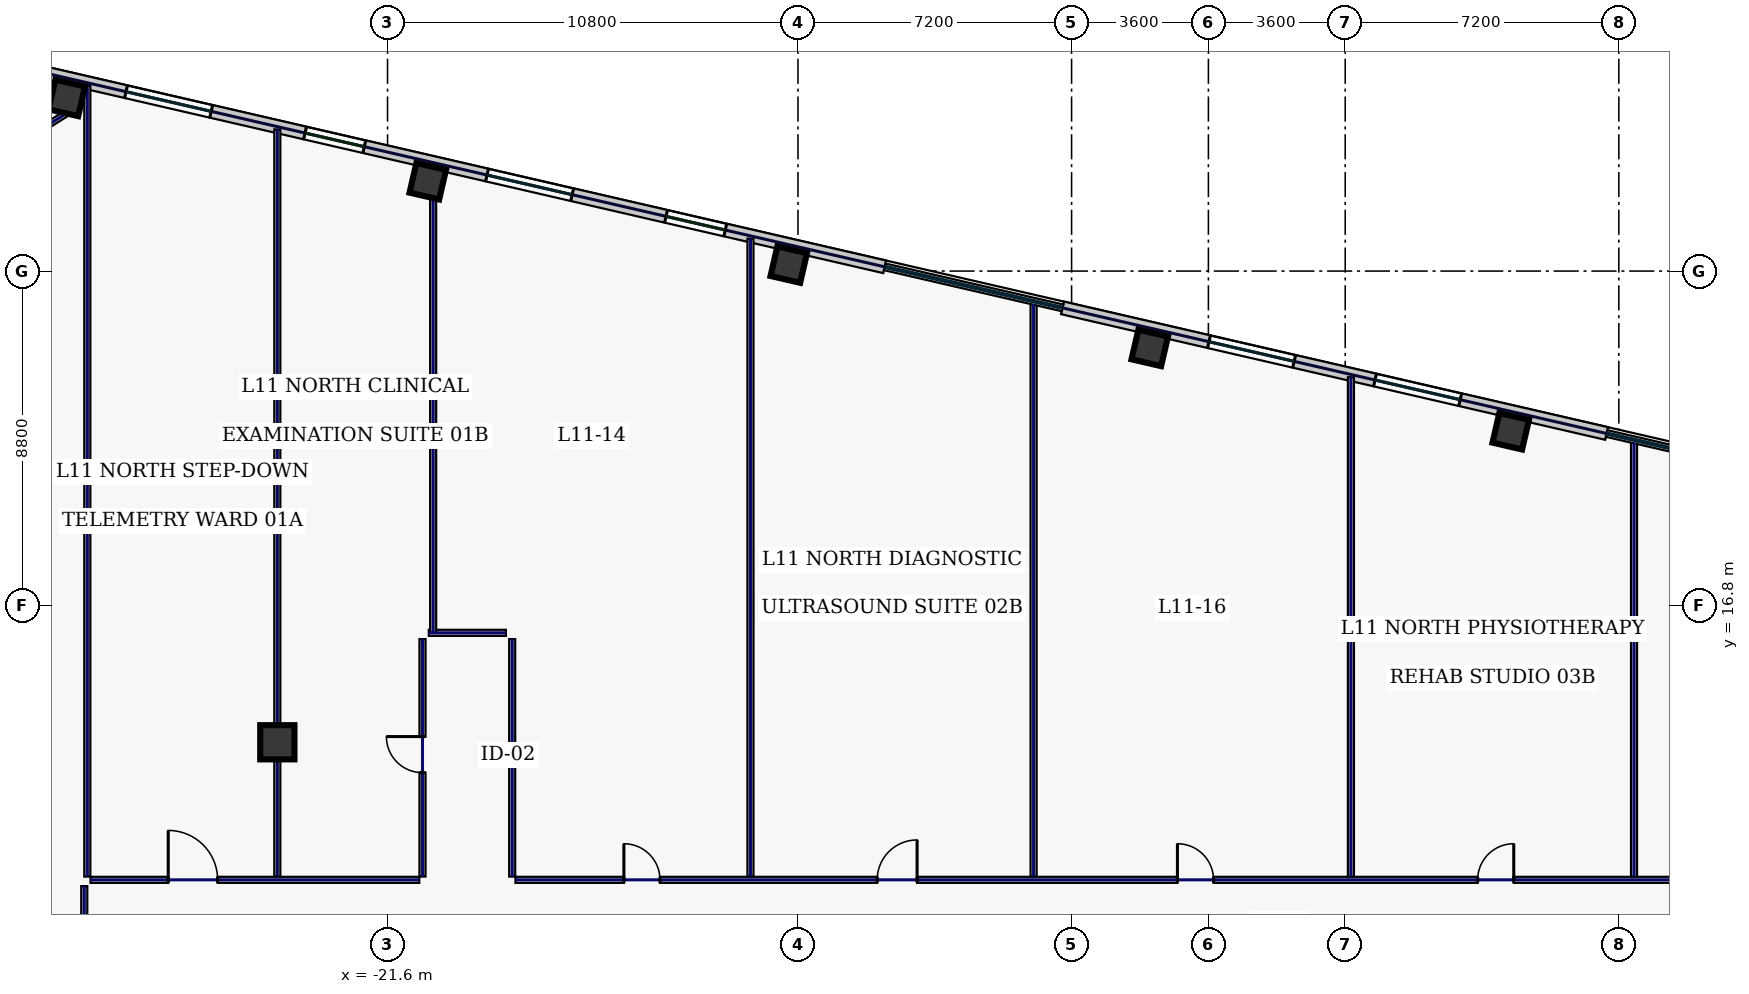
"""IFC4 building model, lengths in metres.
Left out: names, types, materials, properties, quantities, classifications, styles, units other than length and angle.
Written with IfcOpenShell. Run it as: python <this file> out.ifc"""

import sys

from ifc_helpers import new_model, si_unit, direction, frame, frame_2d, origin, origin_2d, place, context, subcontext, project, spatial, rectangle, hollow_rectangle, extrude, element, fill, save


model = new_model("IFC4")
c1 = context("Model", 3, precision=1e-05, world=origin(), true_north=direction((0.0, 1.0)))
c2 = subcontext(c1, "Body", "Model", "MODEL_VIEW")
j1 = project(units=[si_unit("LENGTHUNIT", "METRE"), si_unit("PLANEANGLEUNIT", "RADIAN")], contexts=[c1])
p1 = place(None, origin())
s1 = spatial("IfcSite", under=j1, at=p1, CompositionType="ELEMENT")
p2 = place(p1, origin())
s2 = spatial("IfcBuilding", under=s1, at=p2, CompositionType="ELEMENT")
p3 = place(p2, frame((0.0, 0.0, 55.4)))
s3 = spatial("IfcBuildingStorey", under=s2, at=p3, CompositionType="ELEMENT", Elevation=55.4)
p4 = place(p3, frame((-24.5, 13.2, 0.0), z_axis=(0.0, 0.0, 1.0), x_axis=(1.0, 0.0, 0.0)))
e1 = element("IfcColumn", 1, at=p4, inside=s3, PredefinedType="COLUMN", context=c2, shape_type="SweptSolid", body=[
    extrude(hollow_rectangle(XDim=0.9, YDim=0.9, WallThickness=0.04, at=origin_2d()), origin(), (0.0, 0.0, 1.0), 3.74),
])
for number, where, z_axis, x_axis in (
    (2, (7.955, 21.385, 0.0), (0.0, 0.0, 1.0), (0.974, -0.225, 0.0)),
    (3, (-1.544, 23.578, 0.0), (0.0, 0.0, 1.0), (0.974, -0.225, 0.0)),
    (4, (-11.042, 25.771, 0.0), (0.0, 0.0, 1.0), (0.974, -0.225, 0.0)),
    (5, (-20.541, 27.964, 0.0), (0.0, 0.0, 1.0), (0.974, -0.225, 0.0)),
    (6, (-30.04, 30.156, 0.0), (0.0, 0.0, 1.0), (0.974, -0.225, 0.0)),
):
    element("IfcColumn", number, at=place(p3, frame(where, z_axis=z_axis, x_axis=x_axis)), inside=s3, PredefinedType="COLUMN", context=c2, shape_type="SweptSolid", body=[
        extrude(hollow_rectangle(XDim=0.8, YDim=0.8, WallThickness=0.036, at=origin_2d()), origin(), (0.0, 0.0, 1.0), 3.74),
    ])
p5 = place(p3, frame((10.481, 21.325, 0.0), z_axis=(0.0, 0.0, 1.0), x_axis=(-0.974369353393, 0.2249541357, 0.0)))
e7 = element("IfcWall", 7, at=p5, inside=s3, PredefinedType="STANDARD", context=c2, shape_type="SweptSolid", body=[
    extrude(rectangle(XDim=14.697, YDim=0.34, at=frame_2d((7.349, 0.0))), origin(), (0.0, 0.0, 1.0), 3.74),
])
p6 = place(p5, frame((8.441, 0.0, 0.77)))
e8 = element("IfcOpeningElement", 8, at=p6, cuts=e7, PredefinedType="OPENING", context=c2, shape_type="SweptSolid", body=[
    extrude(rectangle(XDim=2.3, YDim=2.1, at=frame_2d((1.15, 1.05))), frame((0.0, 0.18, 0.0), z_axis=(0.0, -1.0, 0.0), x_axis=(1.0, 0.0, 0.0)), (0.0, 0.0, 1.0), 0.36),
])
p7 = place(p5, frame((3.956, 0.0, 0.77)))
e9 = element("IfcOpeningElement", 9, at=p7, cuts=e7, PredefinedType="OPENING", context=c2, shape_type="SweptSolid", body=[
    extrude(rectangle(XDim=2.3, YDim=2.1, at=frame_2d((1.15, 1.05))), frame((0.0, 0.18, 0.0), z_axis=(0.0, -1.0, 0.0), x_axis=(1.0, 0.0, 0.0)), (0.0, 0.0, 1.0), 0.36),
])
p8 = place(p3, frame((-8.517, 25.711, 0.0), z_axis=(0.0, 0.0, 1.0), x_axis=(-0.974372845456, 0.224939009598, 0.0)))
e10 = element("IfcWall", 10, at=p8, inside=s3, PredefinedType="STANDARD", context=c2, shape_type="SweptSolid", body=[
    extrude(rectangle(XDim=22.652, YDim=0.34, at=frame_2d((11.326, 0.0))), origin(), (0.0, 0.0, 1.0), 3.74),
])
p9 = place(p8, frame((18.189, 0.0, 0.77)))
e11 = element("IfcOpeningElement", 11, at=p9, cuts=e10, PredefinedType="OPENING", context=c2, shape_type="SweptSolid", body=[
    extrude(rectangle(XDim=2.3, YDim=2.1, at=frame_2d((1.15, 1.05))), frame((0.0, 0.18, 0.0), z_axis=(0.0, -1.0, 0.0), x_axis=(1.0, 0.0, 0.0)), (0.0, 0.0, 1.0), 0.36),
])
p10 = place(p8, frame((14.055, 0.0, 0.22)))
e12 = element("IfcOpeningElement", 12, at=p10, cuts=e10, PredefinedType="OPENING", context=c2, shape_type="SweptSolid", body=[
    extrude(rectangle(XDim=1.6, YDim=1.2, at=frame_2d((0.8, 0.6))), frame((0.0, 0.18, 0.0), z_axis=(0.0, -1.0, 0.0), x_axis=(1.0, 0.0, 0.0)), (0.0, 0.0, 1.0), 0.36),
])
p11 = place(p8, frame((8.441, 0.0, 0.77)))
e13 = element("IfcOpeningElement", 13, at=p11, cuts=e10, PredefinedType="OPENING", context=c2, shape_type="SweptSolid", body=[
    extrude(rectangle(XDim=2.3, YDim=2.1, at=frame_2d((1.15, 1.05))), frame((0.0, 0.18, 0.0), z_axis=(0.0, -1.0, 0.0), x_axis=(1.0, 0.0, 0.0)), (0.0, 0.0, 1.0), 0.36),
])
p12 = place(p8, frame((4.306, 0.0, 0.22)))
e14 = element("IfcOpeningElement", 14, at=p12, cuts=e10, PredefinedType="OPENING", context=c2, shape_type="SweptSolid", body=[
    extrude(rectangle(XDim=1.6, YDim=1.2, at=frame_2d((0.8, 0.6))), frame((0.0, 0.18, 0.0), z_axis=(0.0, -1.0, 0.0), x_axis=(1.0, 0.0, 0.0)), (0.0, 0.0, 1.0), 0.36),
])
p13 = place(p3, frame((-29.86, 29.868, 0.0), z_axis=(0.0, 0.0, 1.0), x_axis=(-0.848043064089, -0.529927317139, 0.0)))
e15 = element("IfcWall", 15, at=p13, inside=s3, PredefinedType="PARTITIONING", context=c2, shape_type="SweptSolid", body=[
    extrude(rectangle(XDim=7.354, YDim=0.16, at=frame_2d((3.677, 0.0))), origin(), (0.0, 0.0, 1.0), 3.74),
])
p14 = place(p3, frame((-29.58, -9.215, 0.0), z_axis=(0.0, 0.0, 1.0), x_axis=(0.0, 1.0, 0.0)))
e16 = element("IfcWall", 16, at=p14, inside=s3, PredefinedType="PARTITIONING", context=c2, shape_type="SweptSolid", body=[
    extrude(rectangle(XDim=18.63, YDim=0.16, at=frame_2d((9.315, 0.0))), origin(), (0.0, 0.0, 1.0), 3.74),
])
p15 = place(p14, frame((1.769, 0.0, 0.0)))
e17 = element("IfcOpeningElement", 17, at=p15, cuts=e16, PredefinedType="OPENING", context=c2, shape_type="SweptSolid", body=[
    extrude(rectangle(XDim=0.95, YDim=2.2, at=frame_2d((0.475, 1.1))), frame((0.0, 0.09, 0.0), z_axis=(0.0, -1.0, 0.0), x_axis=(1.0, 0.0, 0.0)), (0.0, 0.0, 1.0), 0.18),
])
p16 = place(p14, frame((5.6, 0.0, 0.0)))
e18 = element("IfcOpeningElement", 18, at=p16, cuts=e16, PredefinedType="OPENING", context=c2, shape_type="SweptSolid", body=[
    extrude(rectangle(XDim=0.95, YDim=2.2, at=frame_2d((0.475, 1.1))), frame((0.0, 0.09, 0.0), z_axis=(0.0, -1.0, 0.0), x_axis=(1.0, 0.0, 0.0)), (0.0, 0.0, 1.0), 0.18),
])
p17 = place(p14, frame((10.8, 0.0, 0.0)))
e19 = element("IfcOpeningElement", 19, at=p17, cuts=e16, PredefinedType="OPENING", context=c2, shape_type="SweptSolid", body=[
    extrude(rectangle(XDim=0.95, YDim=2.2, at=frame_2d((0.475, 1.1))), frame((0.0, 0.09, 0.0), z_axis=(0.0, -1.0, 0.0), x_axis=(1.0, 0.0, 0.0)), (0.0, 0.0, 1.0), 0.18),
])
p18 = place(p14, frame((15.981, 0.0, 0.0)))
e20 = element("IfcOpeningElement", 20, at=p18, cuts=e16, PredefinedType="OPENING", context=c2, shape_type="SweptSolid", body=[
    extrude(rectangle(XDim=0.95, YDim=2.2, at=frame_2d((0.475, 1.1))), frame((0.0, 0.09, 0.0), z_axis=(0.0, -1.0, 0.0), x_axis=(1.0, 0.0, 0.0)), (0.0, 0.0, 1.0), 0.18),
])
p19 = place(p3, frame((-29.415, 9.58, 0.0), z_axis=(0.0, 0.0, 1.0), x_axis=(1.0, 0.0, 0.0)))
e21 = element("IfcWall", 21, at=p19, inside=s3, PredefinedType="PARTITIONING", context=c2, shape_type="SweptSolid", body=[
    extrude(rectangle(XDim=8.65, YDim=0.16, at=frame_2d((4.325, 0.0))), origin(), (0.0, 0.0, 1.0), 3.74),
])
p20 = place(p19, frame((2.044, 0.0, 0.0)))
e22 = element("IfcOpeningElement", 22, at=p20, cuts=e21, PredefinedType="OPENING", context=c2, shape_type="SweptSolid", body=[
    extrude(rectangle(XDim=1.3, YDim=2.2, at=frame_2d((0.65, 1.1))), frame((0.0, 0.09, 0.0), z_axis=(0.0, -1.0, 0.0), x_axis=(1.0, 0.0, 0.0)), (0.0, 0.0, 1.0), 0.18),
])
p21 = place(p3, frame((-20.68, 9.665, 0.0), z_axis=(0.0, 0.0, 1.0), x_axis=(0.0, 1.0, 0.0)))
e23 = element("IfcWall", 23, at=p21, inside=s3, PredefinedType="PARTITIONING", context=c2, shape_type="SweptSolid", body=[
    extrude(rectangle(XDim=6.25, YDim=0.16, at=frame_2d((3.125, 0.0))), origin(), (0.0, 0.0, 1.0), 3.74),
])
p22 = place(p21, frame((2.735, 0.0, 0.0)))
e24 = element("IfcOpeningElement", 24, at=p22, cuts=e23, PredefinedType="OPENING", context=c2, shape_type="SweptSolid", body=[
    extrude(rectangle(XDim=0.95, YDim=2.2, at=frame_2d((0.475, 1.1))), frame((0.0, 0.09, 0.0), z_axis=(0.0, -1.0, 0.0), x_axis=(1.0, 0.0, 0.0)), (0.0, 0.0, 1.0), 0.18),
])
p23 = place(p3, frame((-20.515, 16.08, 0.0), z_axis=(0.0, 0.0, 1.0), x_axis=(1.0, 0.0, 0.0)))
e25 = element("IfcWall", 25, at=p23, inside=s3, PredefinedType="PARTITIONING", context=c2, shape_type="SweptSolid", body=[
    extrude(rectangle(XDim=2.03, YDim=0.16, at=frame_2d((1.015, 0.0))), origin(), (0.0, 0.0, 1.0), 3.74),
])
p24 = place(p3, frame((-18.32, 15.915, 0.0), z_axis=(0.0, 0.0, 1.0), x_axis=(0.0, -1.0, 0.0)))
e26 = element("IfcWall", 26, at=p24, inside=s3, PredefinedType="PARTITIONING", context=c2, shape_type="SweptSolid", body=[
    extrude(rectangle(XDim=6.25, YDim=0.16, at=frame_2d((3.125, 0.0))), origin(), (0.0, 0.0, 1.0), 3.74),
])
p25 = place(p3, frame((-18.235, 9.58, 0.0), z_axis=(0.0, 0.0, 1.0), x_axis=(1.0, 0.0, 0.0)))
e27 = element("IfcWall", 27, at=p25, inside=s3, PredefinedType="PARTITIONING", context=c2, shape_type="SweptSolid", body=[
    extrude(rectangle(XDim=47.65, YDim=0.16, at=frame_2d((23.825, 0.0))), origin(), (0.0, 0.0, 1.0), 3.74),
])
p26 = place(p25, frame((2.854, 0.0, 0.0)))
e28 = element("IfcOpeningElement", 28, at=p26, cuts=e27, PredefinedType="OPENING", context=c2, shape_type="SweptSolid", body=[
    extrude(rectangle(XDim=0.95, YDim=2.2, at=frame_2d((0.475, 1.1))), frame((0.0, 0.09, 0.0), z_axis=(0.0, -1.0, 0.0), x_axis=(1.0, 0.0, 0.0)), (0.0, 0.0, 1.0), 0.18),
])
p27 = place(p25, frame((9.52, 0.0, 0.0)))
e29 = element("IfcOpeningElement", 29, at=p27, cuts=e27, PredefinedType="OPENING", context=c2, shape_type="SweptSolid", body=[
    extrude(rectangle(XDim=1.05, YDim=2.2, at=frame_2d((0.525, 1.1))), frame((0.0, 0.09, 0.0), z_axis=(0.0, -1.0, 0.0), x_axis=(1.0, 0.0, 0.0)), (0.0, 0.0, 1.0), 0.18),
])
p28 = place(p25, frame((17.42, 0.0, 0.0)))
e30 = element("IfcOpeningElement", 30, at=p28, cuts=e27, PredefinedType="OPENING", context=c2, shape_type="SweptSolid", body=[
    extrude(rectangle(XDim=0.95, YDim=2.2, at=frame_2d((0.475, 1.1))), frame((0.0, 0.09, 0.0), z_axis=(0.0, -1.0, 0.0), x_axis=(1.0, 0.0, 0.0)), (0.0, 0.0, 1.0), 0.18),
])
p29 = place(p25, frame((25.32, 0.0, 0.0)))
e31 = element("IfcOpeningElement", 31, at=p29, cuts=e27, PredefinedType="OPENING", context=c2, shape_type="SweptSolid", body=[
    extrude(rectangle(XDim=0.95, YDim=2.2, at=frame_2d((0.475, 1.1))), frame((0.0, 0.09, 0.0), z_axis=(0.0, -1.0, 0.0), x_axis=(1.0, 0.0, 0.0)), (0.0, 0.0, 1.0), 0.18),
])
p30 = place(p25, frame((34.67, 0.0, 0.0)))
e32 = element("IfcOpeningElement", 32, at=p30, cuts=e27, PredefinedType="OPENING", context=c2, shape_type="SweptSolid", body=[
    extrude(rectangle(XDim=1.3, YDim=2.2, at=frame_2d((0.65, 1.1))), frame((0.0, 0.09, 0.0), z_axis=(0.0, -1.0, 0.0), x_axis=(1.0, 0.0, 0.0)), (0.0, 0.0, 1.0), 0.18),
])
p31 = place(p25, frame((43.626, 0.0, 0.0)))
e33 = element("IfcOpeningElement", 33, at=p31, cuts=e27, PredefinedType="OPENING", context=c2, shape_type="SweptSolid", body=[
    extrude(rectangle(XDim=1.3, YDim=2.2, at=frame_2d((0.65, 1.1))), frame((0.0, 0.09, 0.0), z_axis=(0.0, -1.0, 0.0), x_axis=(1.0, 0.0, 0.0)), (0.0, 0.0, 1.0), 0.18),
])
p32 = place(p3, frame((-29.5, 9.665, 0.0), z_axis=(0.0, 0.0, 1.0), x_axis=(0.0, 1.0, 0.0)))
e34 = element("IfcWall", 34, at=p32, inside=s3, PredefinedType="PARTITIONING", context=c2, shape_type="SweptSolid", body=[
    extrude(rectangle(XDim=20.819, YDim=0.16, at=frame_2d((10.409, 0.0))), origin(), (0.0, 0.0, 1.0), 3.74),
])
p33 = place(p3, frame((-20.4, 16.085, 0.0), z_axis=(0.0, 0.0, 1.0), x_axis=(0.0, 1.0, 0.0)))
e35 = element("IfcWall", 35, at=p33, inside=s3, PredefinedType="PARTITIONING", context=c2, shape_type="SweptSolid", body=[
    extrude(rectangle(XDim=12.298, YDim=0.16, at=frame_2d((6.149, 0.0))), origin(), (0.0, 0.0, 1.0), 3.74),
])
p34 = place(p3, frame((-4.6, 9.665, 0.0), z_axis=(0.0, 0.0, 1.0), x_axis=(0.0, 1.0, 0.0)))
e36 = element("IfcWall", 36, at=p34, inside=s3, PredefinedType="PARTITIONING", context=c2, shape_type="SweptSolid", body=[
    extrude(rectangle(XDim=15.07, YDim=0.16, at=frame_2d((7.535, 0.0))), origin(), (0.0, 0.0, 1.0), 3.74),
])
p35 = place(p3, frame((11.2, 9.665, 0.0), z_axis=(0.0, 0.0, 1.0), x_axis=(0.0, 1.0, 0.0)))
e37 = element("IfcWall", 37, at=p35, inside=s3, PredefinedType="PARTITIONING", context=c2, shape_type="SweptSolid", body=[
    extrude(rectangle(XDim=11.422, YDim=0.16, at=frame_2d((5.711, 0.0))), origin(), (0.0, 0.0, 1.0), 3.74),
])
p36 = place(p3, frame((-24.5, 9.665, 0.0), z_axis=(0.0, 0.0, 1.0), x_axis=(0.0, 1.0, 0.0)))
e38 = element("IfcWall", 38, at=p36, inside=s3, PredefinedType="PARTITIONING", context=c2, shape_type="SweptSolid", body=[
    extrude(rectangle(XDim=19.664, YDim=0.16, at=frame_2d((9.832, 0.0))), origin(), (0.0, 0.0, 1.0), 3.235),
])
p37 = place(p3, frame((-12.05, 9.665, 0.0), z_axis=(0.0, 0.0, 1.0), x_axis=(0.0, 1.0, 0.0)))
e39 = element("IfcWall", 39, at=p37, inside=s3, PredefinedType="PARTITIONING", context=c2, shape_type="SweptSolid", body=[
    extrude(rectangle(XDim=16.79, YDim=0.16, at=frame_2d((8.395, 0.0))), origin(), (0.0, 0.0, 1.0), 3.74),
])
p38 = place(p3, frame((3.75, 9.665, 0.0), z_axis=(0.0, 0.0, 1.0), x_axis=(0.0, 1.0, 0.0)))
e40 = element("IfcWall", 40, at=p38, inside=s3, PredefinedType="PARTITIONING", context=c2, shape_type="SweptSolid", body=[
    extrude(rectangle(XDim=13.142, YDim=0.16, at=frame_2d((6.571, 0.0))), origin(), (0.0, 0.0, 1.0), 3.74),
])
p39 = place(p6, origin())
e41 = element("IfcWindow", 41, at=p39, inside=s3, PartitioningType="SINGLE_PANEL", PredefinedType="WINDOW", context=c2, shape_type="SweptSolid", body=[
    extrude(rectangle(XDim=2.3, YDim=2.1, at=frame_2d((1.15, 1.05))), frame((0.0, 0.03, 0.0), z_axis=(0.0, -1.0, 0.0), x_axis=(1.0, 0.0, 0.0)), (0.0, 0.0, 1.0), 0.06),
])
fill(e8, e41)
p40 = place(p7, origin())
e42 = element("IfcWindow", 42, at=p40, inside=s3, PartitioningType="SINGLE_PANEL", PredefinedType="WINDOW", context=c2, shape_type="SweptSolid", body=[
    extrude(rectangle(XDim=2.3, YDim=2.1, at=frame_2d((1.15, 1.05))), frame((0.0, 0.03, 0.0), z_axis=(0.0, -1.0, 0.0), x_axis=(1.0, 0.0, 0.0)), (0.0, 0.0, 1.0), 0.06),
])
fill(e9, e42)
p41 = place(p9, origin())
e43 = element("IfcWindow", 43, at=p41, inside=s3, PartitioningType="SINGLE_PANEL", PredefinedType="WINDOW", context=c2, shape_type="SweptSolid", body=[
    extrude(rectangle(XDim=2.3, YDim=2.1, at=frame_2d((1.15, 1.05))), frame((0.0, 0.03, 0.0), z_axis=(0.0, -1.0, 0.0), x_axis=(1.0, 0.0, 0.0)), (0.0, 0.0, 1.0), 0.06),
])
fill(e11, e43)
p42 = place(p10, origin())
e44 = element("IfcWindow", 44, at=p42, inside=s3, PartitioningType="SINGLE_PANEL", PredefinedType="WINDOW", context=c2, shape_type="SweptSolid", body=[
    extrude(rectangle(XDim=1.6, YDim=1.2, at=frame_2d((0.8, 0.6))), frame((0.0, 0.03, 0.0), z_axis=(0.0, -1.0, 0.0), x_axis=(1.0, 0.0, 0.0)), (0.0, 0.0, 1.0), 0.06),
])
fill(e12, e44)
p43 = place(p11, origin())
e45 = element("IfcWindow", 45, at=p43, inside=s3, PartitioningType="SINGLE_PANEL", PredefinedType="WINDOW", context=c2, shape_type="SweptSolid", body=[
    extrude(rectangle(XDim=2.3, YDim=2.1, at=frame_2d((1.15, 1.05))), frame((0.0, 0.03, 0.0), z_axis=(0.0, -1.0, 0.0), x_axis=(1.0, 0.0, 0.0)), (0.0, 0.0, 1.0), 0.06),
])
fill(e13, e45)
p44 = place(p12, origin())
e46 = element("IfcWindow", 46, at=p44, inside=s3, PartitioningType="SINGLE_PANEL", PredefinedType="WINDOW", context=c2, shape_type="SweptSolid", body=[
    extrude(rectangle(XDim=1.6, YDim=1.2, at=frame_2d((0.8, 0.6))), frame((0.0, 0.03, 0.0), z_axis=(0.0, -1.0, 0.0), x_axis=(1.0, 0.0, 0.0)), (0.0, 0.0, 1.0), 0.06),
])
fill(e14, e46)
p45 = place(p20, origin())
e47 = element("IfcDoor", 47, at=p45, inside=s3, OperationType="SINGLE_SWING_LEFT", PredefinedType="DOOR", context=c2, shape_type="SweptSolid", body=[
    extrude(rectangle(XDim=1.3, YDim=2.2, at=frame_2d((0.65, 1.1))), frame((0.0, 0.025, 0.0), z_axis=(0.0, -1.0, 0.0), x_axis=(1.0, 0.0, 0.0)), (0.0, 0.0, 1.0), 0.05),
])
fill(e22, e47)
p46 = place(p22, origin())
e48 = element("IfcDoor", 48, at=p46, inside=s3, OperationType="SINGLE_SWING_RIGHT", PredefinedType="DOOR", context=c2, shape_type="SweptSolid", body=[
    extrude(rectangle(XDim=0.95, YDim=2.2, at=frame_2d((0.475, 1.1))), frame((0.0, 0.025, 0.0), z_axis=(0.0, -1.0, 0.0), x_axis=(1.0, 0.0, 0.0)), (0.0, 0.0, 1.0), 0.05),
])
fill(e24, e48)
p47 = place(p26, origin())
e49 = element("IfcDoor", 49, at=p47, inside=s3, OperationType="SINGLE_SWING_LEFT", PredefinedType="DOOR", context=c2, shape_type="SweptSolid", body=[
    extrude(rectangle(XDim=0.95, YDim=2.2, at=frame_2d((0.475, 1.1))), frame((0.0, 0.025, 0.0), z_axis=(0.0, -1.0, 0.0), x_axis=(1.0, 0.0, 0.0)), (0.0, 0.0, 1.0), 0.05),
])
fill(e28, e49)
p48 = place(p27, origin())
e50 = element("IfcDoor", 50, at=p48, inside=s3, OperationType="SINGLE_SWING_RIGHT", PredefinedType="DOOR", context=c2, shape_type="SweptSolid", body=[
    extrude(rectangle(XDim=1.05, YDim=2.2, at=frame_2d((0.525, 1.1))), frame((0.0, 0.025, 0.0), z_axis=(0.0, -1.0, 0.0), x_axis=(1.0, 0.0, 0.0)), (0.0, 0.0, 1.0), 0.05),
])
fill(e29, e50)
p49 = place(p28, origin())
e51 = element("IfcDoor", 51, at=p49, inside=s3, OperationType="SINGLE_SWING_LEFT", PredefinedType="DOOR", context=c2, shape_type="SweptSolid", body=[
    extrude(rectangle(XDim=0.95, YDim=2.2, at=frame_2d((0.475, 1.1))), frame((0.0, 0.025, 0.0), z_axis=(0.0, -1.0, 0.0), x_axis=(1.0, 0.0, 0.0)), (0.0, 0.0, 1.0), 0.05),
])
fill(e30, e51)
p50 = place(p29, origin())
e52 = element("IfcDoor", 52, at=p50, inside=s3, OperationType="SINGLE_SWING_RIGHT", PredefinedType="DOOR", context=c2, shape_type="SweptSolid", body=[
    extrude(rectangle(XDim=0.95, YDim=2.2, at=frame_2d((0.475, 1.1))), frame((0.0, 0.025, 0.0), z_axis=(0.0, -1.0, 0.0), x_axis=(1.0, 0.0, 0.0)), (0.0, 0.0, 1.0), 0.05),
])
fill(e31, e52)
save(model, sys.argv[1])
